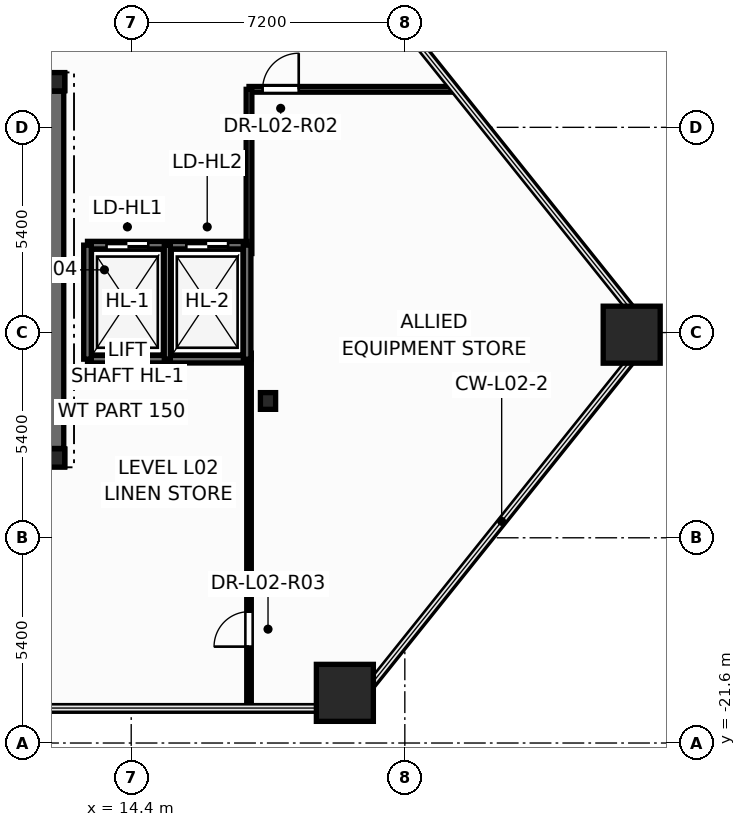
"""IFC4 building model, lengths in metres.
Left out: names, types, materials, properties, quantities, classifications, styles, units other than length and angle.
Written with IfcOpenShell. Run it as: python <this file> out.ifc"""

import sys

from ifc_helpers import new_model, si_unit, direction, frame, frame_2d, origin, origin_2d, place, context, subcontext, project, spatial, rectangle, hollow_rectangle, i_section, extrude, element, fill, save


model = new_model("IFC4")
c1 = context("Model", 3, precision=1e-05, world=origin(), true_north=direction((0.0, 1.0)))
c2 = subcontext(c1, "Body", "Model", "MODEL_VIEW")
j1 = project(units=[si_unit("LENGTHUNIT", "METRE"), si_unit("PLANEANGLEUNIT", "RADIAN")], contexts=[c1])
p1 = place(None, origin())
s1 = spatial("IfcSite", under=j1, at=p1, CompositionType="ELEMENT")
p2 = place(p1, origin())
s2 = spatial("IfcBuilding", under=s1, at=p2, CompositionType="ELEMENT")
p3 = place(p2, frame((0.0, 0.0, 9.9)))
s3 = spatial("IfcBuildingStorey", under=s2, at=p3, CompositionType="ELEMENT", Elevation=9.9)
for number, where, z_axis, x_axis in (
    (1, (20.022, -20.28, 0.0), (0.0, 0.0, 1.0), (1.0, 0.0, 0.0)),
    (2, (27.57, -10.856, 0.0), (0.0, 0.0, 1.0), (1.0, 0.0, 0.0)),
):
    element("IfcColumn", number, at=place(p3, frame(where, z_axis=z_axis, x_axis=x_axis)), inside=s3, PredefinedType="COLUMN", context=c2, shape_type="SweptSolid", body=[
        extrude(hollow_rectangle(XDim=1.5, YDim=1.5, WallThickness=0.075, at=origin_2d()), origin(), (0.0, 0.0, 1.0), 4.5),
    ])
for number, where, z_axis, x_axis in (
    (3, (12.4, -14.1, 0.0), (0.0, 0.0, 1.0), (1.0, 0.0, 0.0)),
    (4, (12.4, -4.2, 0.0), (0.0, 0.0, 1.0), (1.0, 0.0, 0.0)),
):
    element("IfcColumn", number, at=place(p3, frame(where, z_axis=z_axis, x_axis=x_axis)), inside=s3, PredefinedType="COLUMN", context=c2, shape_type="SweptSolid", body=[
        extrude(i_section(OverallWidth=0.5, OverallDepth=0.482, WebThickness=0.04, FlangeThickness=0.045, at=origin_2d()), origin(), (0.0, 0.0, 1.0), 4.5),
    ])
p4 = place(p3, frame((18.0, -12.6, 0.0), z_axis=(0.0, 0.0, 1.0), x_axis=(1.0, 0.0, 0.0)))
e5 = element("IfcColumn", 5, at=p4, inside=s3, PredefinedType="COLUMN", context=c2, shape_type="SweptSolid", body=[
    extrude(i_section(OverallWidth=0.4, OverallDepth=0.44, WebThickness=0.028, FlangeThickness=0.04, at=origin_2d()), origin(), (0.0, 0.0, 1.0), 4.5),
])
p5 = place(p3, frame((-12.65, -14.1, 0.0), z_axis=(0.0, 0.0, 1.0), x_axis=(1.0, 0.0, 0.0)))
e6 = element("IfcWall", 6, at=p5, inside=s3, PredefinedType="SHEAR", context=c2, shape_type="SweptSolid", body=[
    extrude(rectangle(XDim=25.3, YDim=0.45, at=frame_2d((12.65, 0.0))), origin(), (0.0, 0.0, 1.0), 4.5),
])
p6 = place(p3, frame((-12.65, -4.2, 0.0), z_axis=(0.0, 0.0, 1.0), x_axis=(1.0, 0.0, 0.0)))
e7 = element("IfcWall", 7, at=p6, inside=s3, PredefinedType="SHEAR", context=c2, shape_type="SweptSolid", body=[
    extrude(rectangle(XDim=25.3, YDim=0.45, at=frame_2d((12.65, 0.0))), origin(), (0.0, 0.0, 1.0), 4.5),
])
p7 = place(p6, frame((0.95, 0.0, 0.0)))
e8 = element("IfcOpeningElement", 8, at=p7, cuts=e7, PredefinedType="OPENING", context=c2, shape_type="SweptSolid", body=[
    extrude(rectangle(XDim=0.756, YDim=2.054, at=frame_2d((0.375, 1.027))), frame((0.0, 0.235, 0.0), z_axis=(0.0, -1.0, 0.0), x_axis=(1.0, 0.0, 0.0)), (0.0, 0.0, 1.0), 0.47),
])
p8 = place(p6, frame((2.6, 0.0, 0.0)))
e9 = element("IfcOpeningElement", 9, at=p8, cuts=e7, PredefinedType="OPENING", context=c2, shape_type="SweptSolid", body=[
    extrude(rectangle(XDim=0.756, YDim=2.054, at=frame_2d((0.375, 1.027))), frame((0.0, 0.235, 0.0), z_axis=(0.0, -1.0, 0.0), x_axis=(1.0, 0.0, 0.0)), (0.0, 0.0, 1.0), 0.47),
])
p9 = place(p6, frame((21.85, 0.0, 0.0)))
e10 = element("IfcOpeningElement", 10, at=p9, cuts=e7, PredefinedType="OPENING", context=c2, shape_type="SweptSolid", body=[
    extrude(rectangle(XDim=0.756, YDim=2.054, at=frame_2d((0.375, 1.027))), frame((0.0, 0.235, 0.0), z_axis=(0.0, -1.0, 0.0), x_axis=(1.0, 0.0, 0.0)), (0.0, 0.0, 1.0), 0.47),
])
p10 = place(p6, frame((23.5, 0.0, 0.0)))
e11 = element("IfcOpeningElement", 11, at=p10, cuts=e7, PredefinedType="OPENING", context=c2, shape_type="SweptSolid", body=[
    extrude(rectangle(XDim=0.756, YDim=2.054, at=frame_2d((0.375, 1.027))), frame((0.0, 0.235, 0.0), z_axis=(0.0, -1.0, 0.0), x_axis=(1.0, 0.0, 0.0)), (0.0, 0.0, 1.0), 0.47),
])
p11 = place(p6, frame((5.85, 0.0, 0.0)))
e12 = element("IfcOpeningElement", 12, at=p11, cuts=e7, PredefinedType="OPENING", context=c2, shape_type="SweptSolid", body=[
    extrude(rectangle(XDim=1.006, YDim=2.104, at=frame_2d((0.5, 1.052))), frame((0.0, 0.235, 0.0), z_axis=(0.0, -1.0, 0.0), x_axis=(1.0, 0.0, 0.0)), (0.0, 0.0, 1.0), 0.47),
])
p12 = place(p6, frame((10.35, 0.0, 0.0)))
e13 = element("IfcOpeningElement", 13, at=p12, cuts=e7, PredefinedType="OPENING", context=c2, shape_type="SweptSolid", body=[
    extrude(rectangle(XDim=1.406, YDim=2.154, at=frame_2d((0.7, 1.077))), frame((0.0, 0.235, 0.0), z_axis=(0.0, -1.0, 0.0), x_axis=(1.0, 0.0, 0.0)), (0.0, 0.0, 1.0), 0.47),
])
p13 = place(p6, frame((18.45, 0.0, 0.0)))
e14 = element("IfcOpeningElement", 14, at=p13, cuts=e7, PredefinedType="OPENING", context=c2, shape_type="SweptSolid", body=[
    extrude(rectangle(XDim=1.006, YDim=2.104, at=frame_2d((0.5, 1.052))), frame((0.0, 0.235, 0.0), z_axis=(0.0, -1.0, 0.0), x_axis=(1.0, 0.0, 0.0)), (0.0, 0.0, 1.0), 0.47),
])
for number, where, z_axis, x_axis in (
    (15, (8.48, -5.52, 0.0), (0.0, 0.0, 1.0), (1.0, 0.0, 0.0)),
    (16, (8.48, -13.1, 0.0), (0.0, 0.0, 1.0), (1.0, 0.0, 0.0)),
):
    element("IfcWall", number, at=place(p3, frame(where, z_axis=z_axis, x_axis=x_axis)), inside=s3, PredefinedType="SOLIDWALL", context=c2, shape_type="SweptSolid", body=[
        extrude(rectangle(XDim=3.87, YDim=0.2, at=frame_2d((1.935, 0.0))), origin(), (0.0, 0.0, 1.0), 4.5),
    ])
p14 = place(p3, frame((12.4, -13.85, 0.0), z_axis=(0.0, 0.0, 1.0), x_axis=(0.0, 1.0, 0.0)))
e17 = element("IfcWall", 17, at=p14, inside=s3, PredefinedType="SHEAR", context=c2, shape_type="SweptSolid", body=[
    extrude(rectangle(XDim=9.4, YDim=0.45, at=frame_2d((4.7, 0.0))), origin(), (0.0, 0.0, 1.0), 4.5),
])
p15 = place(p3, frame((17.5, -20.68, 0.0), z_axis=(0.0, 0.0, 1.0), x_axis=(0.0, 1.0, 0.0)))
e18 = element("IfcWall", 18, at=p15, inside=s3, PredefinedType="PARTITIONING", context=c2, shape_type="SweptSolid", body=[
    extrude(rectangle(XDim=9.34, YDim=0.12, at=frame_2d((4.67, 0.0))), origin(), (0.0, 0.0, 1.0), 3.583),
])
p16 = place(p15, frame((1.616, 0.0, 0.0)))
e19 = element("IfcOpeningElement", 19, at=p16, cuts=e18, PredefinedType="OPENING", context=c2, shape_type="SweptSolid", body=[
    extrude(rectangle(XDim=0.926, YDim=2.104, at=frame_2d((0.46, 1.052))), frame((0.0, 0.07, 0.0), z_axis=(0.0, -1.0, 0.0), x_axis=(1.0, 0.0, 0.0)), (0.0, 0.0, 1.0), 0.14),
])
p17 = place(p3, frame((17.5, -4.4, 0.0), z_axis=(0.0, 0.0, 1.0), x_axis=(1.0, 0.0, 0.0)))
e20 = element("IfcWall", 20, at=p17, inside=s3, PredefinedType="PARTITIONING", context=c2, shape_type="SweptSolid", body=[
    extrude(rectangle(XDim=5.412, YDim=0.15, at=frame_2d((2.706, 0.0))), origin(), (0.0, 0.0, 1.0), 3.583),
])
p18 = place(p17, frame((0.358, 0.0, 0.0)))
e21 = element("IfcOpeningElement", 21, at=p18, cuts=e20, PredefinedType="OPENING", context=c2, shape_type="SweptSolid", body=[
    extrude(rectangle(XDim=0.956, YDim=2.104, at=frame_2d((0.475, 1.052))), frame((0.0, 0.085, 0.0), z_axis=(0.0, -1.0, 0.0), x_axis=(1.0, 0.0, 0.0)), (0.0, 0.0, 1.0), 0.17),
])
p19 = place(p3, frame((17.5, -8.72, 0.0), z_axis=(0.0, 0.0, 1.0), x_axis=(0.0, 1.0, 0.0)))
e22 = element("IfcWall", 22, at=p19, inside=s3, PredefinedType="PARTITIONING", context=c2, shape_type="SweptSolid", body=[
    extrude(rectangle(XDim=4.32, YDim=0.15, at=frame_2d((2.16, 0.0))), origin(), (0.0, 0.0, 1.0), 4.22),
])
p20 = place(p3, frame((13.25, -11.5, 0.0), z_axis=(0.0, 0.0, 1.0), x_axis=(1.0, 0.0, 0.0)))
e23 = element("IfcWall", 23, at=p20, inside=s3, PredefinedType="SOLIDWALL", context=c2, shape_type="SweptSolid", body=[
    extrude(rectangle(XDim=4.2, YDim=0.2, at=frame_2d((2.1, 0.0))), origin(), (0.0, 0.0, 1.0), 4.5),
])
p21 = place(p3, frame((13.25, -8.5, 0.0), z_axis=(0.0, 0.0, 1.0), x_axis=(1.0, 0.0, 0.0)))
e24 = element("IfcWall", 24, at=p21, inside=s3, PredefinedType="SOLIDWALL", context=c2, shape_type="SweptSolid", body=[
    extrude(rectangle(XDim=4.2, YDim=0.2, at=frame_2d((2.1, 0.0))), origin(), (0.0, 0.0, 1.0), 4.5),
])
p22 = place(p21, frame((0.5, 0.0, 0.0)))
e25 = element("IfcOpeningElement", 25, at=p22, cuts=e24, PredefinedType="OPENING", context=c2, shape_type="SweptSolid", body=[
    extrude(rectangle(XDim=1.106, YDim=2.104, at=frame_2d((0.55, 1.052))), frame((0.0, 0.11, 0.0), z_axis=(0.0, -1.0, 0.0), x_axis=(1.0, 0.0, 0.0)), (0.0, 0.0, 1.0), 0.22),
])
p23 = place(p21, frame((2.6, 0.0, 0.0)))
e26 = element("IfcOpeningElement", 26, at=p23, cuts=e24, PredefinedType="OPENING", context=c2, shape_type="SweptSolid", body=[
    extrude(rectangle(XDim=1.106, YDim=2.104, at=frame_2d((0.55, 1.052))), frame((0.0, 0.11, 0.0), z_axis=(0.0, -1.0, 0.0), x_axis=(1.0, 0.0, 0.0)), (0.0, 0.0, 1.0), 0.22),
])
for number, where, z_axis, x_axis in (
    (27, (13.25, -11.5, 0.0), (0.0, 0.0, 1.0), (0.0, 1.0, 0.0)),
    (28, (17.45, -11.5, 0.0), (0.0, 0.0, 1.0), (0.0, 1.0, 0.0)),
):
    element("IfcWall", number, at=place(p3, frame(where, z_axis=z_axis, x_axis=x_axis)), inside=s3, PredefinedType="SOLIDWALL", context=c2, shape_type="SweptSolid", body=[
        extrude(rectangle(XDim=3.0, YDim=0.2, at=frame_2d((1.5, 0.0))), origin(), (0.0, 0.0, 1.0), 4.5),
    ])
p24 = place(p3, frame((15.35, -11.5, 0.0), z_axis=(0.0, 0.0, 1.0), x_axis=(0.0, 1.0, 0.0)))
e29 = element("IfcWall", 29, at=p24, inside=s3, PredefinedType="PARTITIONING", context=c2, shape_type="SweptSolid", body=[
    extrude(rectangle(XDim=3.0, YDim=0.16, at=frame_2d((1.5, 0.0))), origin(), (0.0, 0.0, 1.0), 4.22),
])
p25 = place(p22, origin())
e30 = element("IfcDoor", 30, at=p25, inside=s3, OperationType="DOUBLE_DOOR_SLIDING", PredefinedType="DOOR", context=c2, shape_type="SweptSolid", body=[
    extrude(rectangle(XDim=1.1, YDim=2.1, at=frame_2d((0.55, 1.05))), frame((0.0, 0.025, 0.0), z_axis=(0.0, -1.0, 0.0), x_axis=(1.0, 0.0, 0.0)), (0.0, 0.0, 1.0), 0.05),
])
fill(e25, e30)
p26 = place(p23, origin())
e31 = element("IfcDoor", 31, at=p26, inside=s3, OperationType="DOUBLE_DOOR_SLIDING", PredefinedType="DOOR", context=c2, shape_type="SweptSolid", body=[
    extrude(rectangle(XDim=1.1, YDim=2.1, at=frame_2d((0.55, 1.05))), frame((0.0, 0.025, 0.0), z_axis=(0.0, -1.0, 0.0), x_axis=(1.0, 0.0, 0.0)), (0.0, 0.0, 1.0), 0.05),
])
fill(e26, e31)
p27 = place(p18, origin())
e32 = element("IfcDoor", 32, at=p27, inside=s3, OperationType="SINGLE_SWING_RIGHT", PredefinedType="DOOR", context=c2, shape_type="SweptSolid", body=[
    extrude(rectangle(XDim=0.95, YDim=2.1, at=frame_2d((0.475, 1.05))), frame((0.0, 0.025, 0.0), z_axis=(0.0, -1.0, 0.0), x_axis=(1.0, 0.0, 0.0)), (0.0, 0.0, 1.0), 0.05),
])
fill(e21, e32)
p28 = place(p16, origin())
e33 = element("IfcDoor", 33, at=p28, inside=s3, OperationType="SINGLE_SWING_LEFT", PredefinedType="DOOR", context=c2, shape_type="SweptSolid", body=[
    extrude(rectangle(XDim=0.92, YDim=2.1, at=frame_2d((0.46, 1.05))), frame((0.0, 0.025, 0.0), z_axis=(0.0, -1.0, 0.0), x_axis=(1.0, 0.0, 0.0)), (0.0, 0.0, 1.0), 0.05),
])
fill(e19, e33)
save(model, sys.argv[1])
